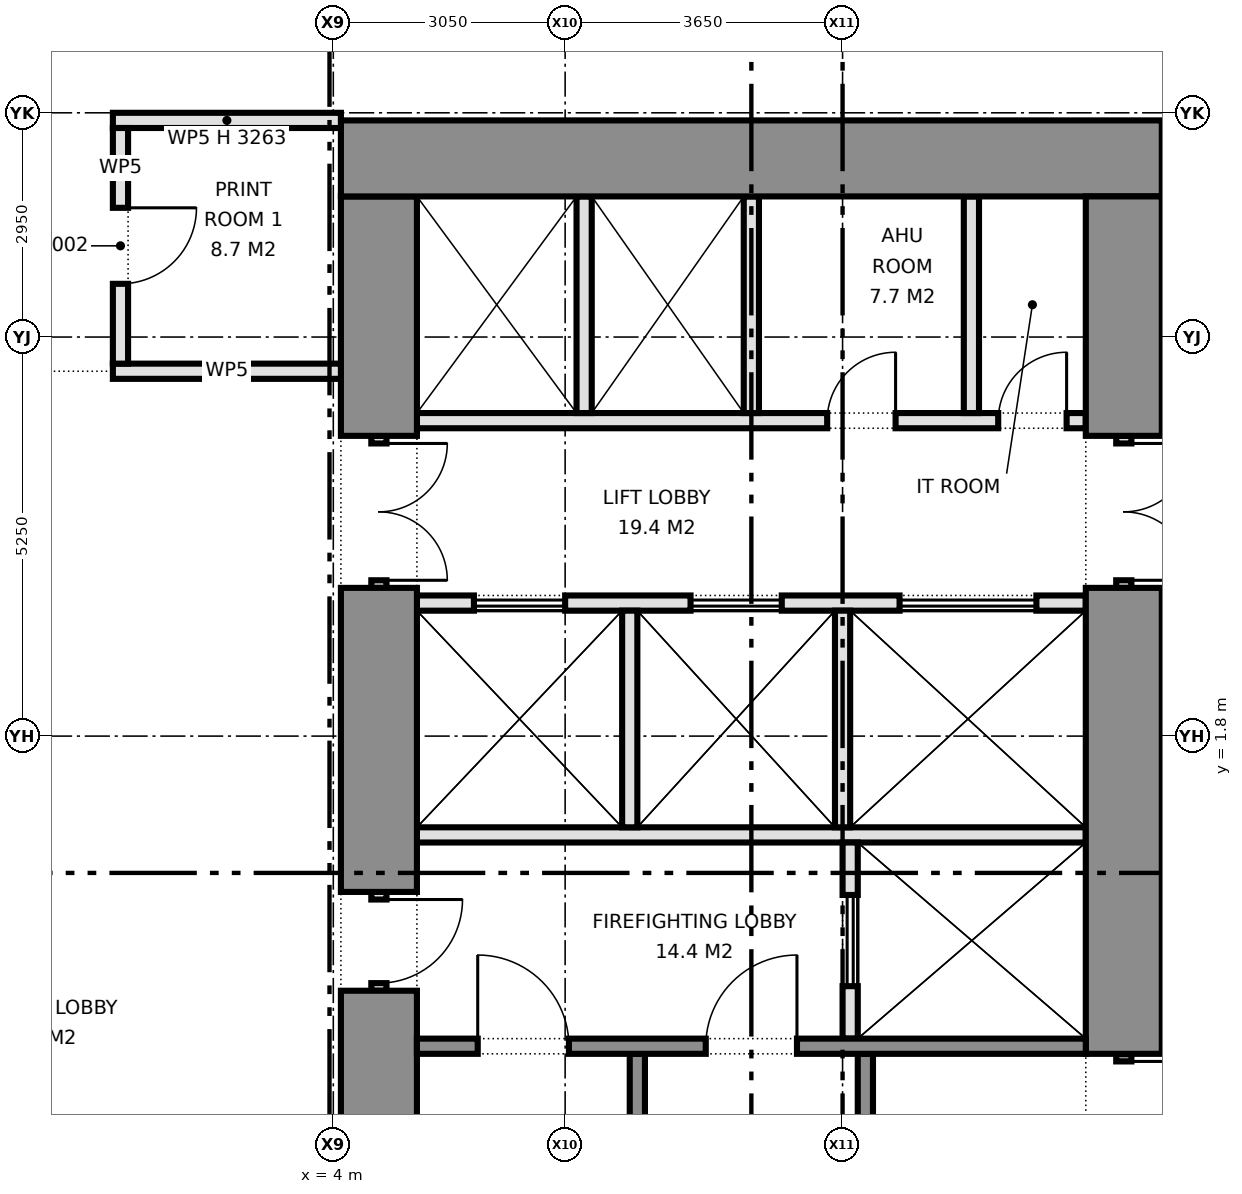
"""IFC4 building model, lengths in metres.
Left out: names, types, materials, properties, quantities, classifications, styles, units other than length and angle.
Written with IfcOpenShell. Run it as: python <this file> out.ifc"""

import sys

from ifc_helpers import new_model, si_unit, direction, frame, frame_2d, origin, place, context, subcontext, project, spatial, rectangle, extrude, element, fill, save


model = new_model("IFC4")
c1 = context("Model", 3, precision=1e-05, world=origin(), true_north=direction((0.0, 1.0)))
c2 = subcontext(c1, "Body", "Model", "MODEL_VIEW")
j1 = project(units=[si_unit("LENGTHUNIT", "METRE"), si_unit("PLANEANGLEUNIT", "RADIAN")], contexts=[c1])
p1 = place(None, origin())
s1 = spatial("IfcSite", under=j1, at=p1, CompositionType="ELEMENT")
p2 = place(p1, origin())
s2 = spatial("IfcBuilding", under=s1, at=p2, CompositionType="ELEMENT")
p3 = place(p2, frame((0.0, 0.0, 73.2)))
s3 = spatial("IfcBuildingStorey", under=s2, at=p3, CompositionType="ELEMENT", Elevation=73.2)
p4 = place(p3, frame((14.9, 9.4, 0.0), z_axis=(0.0, 0.0, 1.0), x_axis=(-1.0, 0.0, 0.0)))
e1 = element("IfcWall", 1, at=p4, inside=s3, PredefinedType="SHEAR", context=c2, shape_type="SweptSolid", body=[
    extrude(rectangle(XDim=10.8, YDim=1.0, at=frame_2d((5.4, 0.0))), origin(), (0.0, 0.0, 1.0), 4.2),
])
p5 = place(p3, frame((14.4, 8.9, 0.0), z_axis=(0.0, 0.0, 1.0), x_axis=(0.0, -1.0, 0.0)))
e2 = element("IfcWall", 2, at=p5, inside=s3, PredefinedType="SHEAR", context=c2, shape_type="SweptSolid", body=[
    extrude(rectangle(XDim=3.15, YDim=1.0, at=frame_2d((1.575, 0.0))), origin(), (0.0, 0.0, 1.0), 4.2),
])
p6 = place(p3, frame((14.4, 5.75, 0.0), z_axis=(0.0, 0.0, 1.0), x_axis=(0.0, -1.0, 0.0)))
e3 = element("IfcWall", 3, at=p6, inside=s3, PredefinedType="PARTITIONING", context=c2, shape_type="SweptSolid", body=[
    extrude(rectangle(XDim=2.0, YDim=0.2, at=frame_2d((1.0, 0.0))), origin(), (0.0, 0.0, 1.0), 2.4),
])
p7 = place(p6, frame((0.1, 0.0, 0.0)))
e4 = element("IfcOpeningElement", 4, at=p7, cuts=e3, PredefinedType="OPENING", context=c2, shape_type="SweptSolid", body=[
    extrude(rectangle(XDim=1.8, YDim=2.1, at=frame_2d((0.9, 1.05))), frame((0.0, 0.11, 0.0), z_axis=(0.0, -1.0, 0.0), x_axis=(1.0, 0.0, 0.0)), (0.0, 0.0, 1.0), 0.22),
])
p8 = place(p3, frame((14.4, 3.75, 0.0), z_axis=(0.0, 0.0, 1.0), x_axis=(0.0, -1.0, 0.0)))
e5 = element("IfcWall", 5, at=p8, inside=s3, PredefinedType="SHEAR", context=c2, shape_type="SweptSolid", body=[
    extrude(rectangle(XDim=6.13, YDim=1.0, at=frame_2d((3.065, 0.0))), origin(), (0.0, 0.0, 1.0), 4.2),
])
p9 = place(p3, frame((14.4, -2.38, 0.0), z_axis=(0.0, 0.0, 1.0), x_axis=(0.0, -1.0, 0.0)))
e6 = element("IfcWall", 6, at=p9, inside=s3, PredefinedType="SHEAR", context=c2, shape_type="SweptSolid", body=[
    extrude(rectangle(XDim=1.3, YDim=0.2, at=frame_2d((0.65, 0.0))), origin(), (0.0, 0.0, 1.0), 2.4),
])
p10 = place(p9, frame((0.1, 0.0, 0.0)))
e7 = element("IfcOpeningElement", 7, at=p10, cuts=e6, PredefinedType="OPENING", context=c2, shape_type="SweptSolid", body=[
    extrude(rectangle(XDim=1.1, YDim=2.1, at=frame_2d((0.55, 1.05))), frame((0.0, 0.11, 0.0), z_axis=(0.0, -1.0, 0.0), x_axis=(1.0, 0.0, 0.0)), (0.0, 0.0, 1.0), 0.22),
])
p11 = place(p3, frame((4.6, 8.9, 0.0), z_axis=(0.0, 0.0, 1.0), x_axis=(0.0, -1.0, 0.0)))
e8 = element("IfcWall", 8, at=p11, inside=s3, PredefinedType="SHEAR", context=c2, shape_type="SweptSolid", body=[
    extrude(rectangle(XDim=3.15, YDim=1.0, at=frame_2d((1.575, 0.0))), origin(), (0.0, 0.0, 1.0), 4.2),
])
p12 = place(p3, frame((4.6, 5.75, 0.0), z_axis=(0.0, 0.0, 1.0), x_axis=(0.0, -1.0, 0.0)))
e9 = element("IfcWall", 9, at=p12, inside=s3, PredefinedType="PARTITIONING", context=c2, shape_type="SweptSolid", body=[
    extrude(rectangle(XDim=2.0, YDim=0.2, at=frame_2d((1.0, 0.0))), origin(), (0.0, 0.0, 1.0), 2.4),
])
p13 = place(p12, frame((0.1, 0.0, 0.0)))
e10 = element("IfcOpeningElement", 10, at=p13, cuts=e9, PredefinedType="OPENING", context=c2, shape_type="SweptSolid", body=[
    extrude(rectangle(XDim=1.8, YDim=2.1, at=frame_2d((0.9, 1.05))), frame((0.0, 0.11, 0.0), z_axis=(0.0, -1.0, 0.0), x_axis=(1.0, 0.0, 0.0)), (0.0, 0.0, 1.0), 0.22),
])
p14 = place(p3, frame((4.6, 3.75, 0.0), z_axis=(0.0, 0.0, 1.0), x_axis=(0.0, -1.0, 0.0)))
e11 = element("IfcWall", 11, at=p14, inside=s3, PredefinedType="SHEAR", context=c2, shape_type="SweptSolid", body=[
    extrude(rectangle(XDim=4.0, YDim=1.0, at=frame_2d((2.0, 0.0))), origin(), (0.0, 0.0, 1.0), 4.2),
])
p15 = place(p3, frame((4.6, -0.25, 0.0), z_axis=(0.0, 0.0, 1.0), x_axis=(0.0, -1.0, 0.0)))
e12 = element("IfcWall", 12, at=p15, inside=s3, PredefinedType="PARTITIONING", context=c2, shape_type="SweptSolid", body=[
    extrude(rectangle(XDim=1.3, YDim=0.2, at=frame_2d((0.65, 0.0))), origin(), (0.0, 0.0, 1.0), 2.4),
])
p16 = place(p15, frame((0.1, 0.0, 0.0)))
e13 = element("IfcOpeningElement", 13, at=p16, cuts=e12, PredefinedType="OPENING", context=c2, shape_type="SweptSolid", body=[
    extrude(rectangle(XDim=1.1, YDim=2.1, at=frame_2d((0.55, 1.05))), frame((0.0, 0.11, 0.0), z_axis=(0.0, -1.0, 0.0), x_axis=(1.0, 0.0, 0.0)), (0.0, 0.0, 1.0), 0.22),
])
p17 = place(p3, frame((4.6, -1.55, 0.0), z_axis=(0.0, 0.0, 1.0), x_axis=(0.0, -1.0, 0.0)))
e14 = element("IfcWall", 14, at=p17, inside=s3, PredefinedType="SHEAR", context=c2, shape_type="SweptSolid", body=[
    extrude(rectangle(XDim=7.35, YDim=1.0, at=frame_2d((3.675, 0.0))), origin(), (0.0, 0.0, 1.0), 4.2),
])
p18 = place(p3, frame((13.9, 5.95, 0.0), z_axis=(0.0, 0.0, 1.0), x_axis=(-1.0, 0.0, 0.0)))
e15 = element("IfcWall", 15, at=p18, inside=s3, PredefinedType="PARTITIONING", context=c2, shape_type="SweptSolid", body=[
    extrude(rectangle(XDim=8.8, YDim=0.2, at=frame_2d((4.4, 0.0))), origin(), (0.0, 0.0, 1.0), 4.2),
])
p19 = place(p18, frame((0.252, 0.0, 0.0)))
e16 = element("IfcOpeningElement", 16, at=p19, cuts=e15, PredefinedType="OPENING", context=c2, shape_type="SweptSolid", body=[
    extrude(rectangle(XDim=0.9, YDim=2.1, at=frame_2d((0.45, 1.05))), frame((0.0, 0.11, 0.0), z_axis=(0.0, -1.0, 0.0), x_axis=(1.0, 0.0, 0.0)), (0.0, 0.0, 1.0), 0.22),
])
p20 = place(p18, frame((2.502, 0.0, 0.0)))
e17 = element("IfcOpeningElement", 17, at=p20, cuts=e15, PredefinedType="OPENING", context=c2, shape_type="SweptSolid", body=[
    extrude(rectangle(XDim=0.9, YDim=2.1, at=frame_2d((0.45, 1.05))), frame((0.0, 0.11, 0.0), z_axis=(0.0, -1.0, 0.0), x_axis=(1.0, 0.0, 0.0)), (0.0, 0.0, 1.0), 0.22),
])
p21 = place(p3, frame((13.9, 3.55, 0.0), z_axis=(0.0, 0.0, 1.0), x_axis=(-1.0, 0.0, 0.0)))
e18 = element("IfcWall", 18, at=p21, inside=s3, PredefinedType="PARTITIONING", context=c2, shape_type="SweptSolid", body=[
    extrude(rectangle(XDim=8.8, YDim=0.2, at=frame_2d((4.4, 0.0))), origin(), (0.0, 0.0, 1.0), 4.2),
])
p22 = place(p21, frame((0.65, 0.0, 0.0)))
e19 = element("IfcOpeningElement", 19, at=p22, cuts=e18, PredefinedType="OPENING", context=c2, shape_type="SweptSolid", body=[
    extrude(rectangle(XDim=1.8, YDim=2.1, at=frame_2d((0.9, 1.05))), frame((0.0, 0.11, 0.0), z_axis=(0.0, -1.0, 0.0), x_axis=(1.0, 0.0, 0.0)), (0.0, 0.0, 1.0), 0.22),
])
p23 = place(p21, frame((4.0, 0.0, 0.0)))
e20 = element("IfcOpeningElement", 20, at=p23, cuts=e18, PredefinedType="OPENING", context=c2, shape_type="SweptSolid", body=[
    extrude(rectangle(XDim=1.2, YDim=2.1, at=frame_2d((0.6, 1.05))), frame((0.0, 0.11, 0.0), z_axis=(0.0, -1.0, 0.0), x_axis=(1.0, 0.0, 0.0)), (0.0, 0.0, 1.0), 0.22),
])
p24 = place(p21, frame((6.85, 0.0, 0.0)))
e21 = element("IfcOpeningElement", 21, at=p24, cuts=e18, PredefinedType="OPENING", context=c2, shape_type="SweptSolid", body=[
    extrude(rectangle(XDim=1.2, YDim=2.1, at=frame_2d((0.6, 1.05))), frame((0.0, 0.11, 0.0), z_axis=(0.0, -1.0, 0.0), x_axis=(1.0, 0.0, 0.0)), (0.0, 0.0, 1.0), 0.22),
])
p25 = place(p3, frame((13.9, 0.5, 0.0), z_axis=(0.0, 0.0, 1.0), x_axis=(-1.0, 0.0, 0.0)))
e22 = element("IfcWall", 22, at=p25, inside=s3, PredefinedType="PARTITIONING", context=c2, shape_type="SweptSolid", body=[
    extrude(rectangle(XDim=8.8, YDim=0.2, at=frame_2d((4.4, 0.0))), origin(), (0.0, 0.0, 1.0), 4.2),
])
p26 = place(p3, frame((10.8, 0.4, 0.0), z_axis=(0.0, 0.0, 1.0), x_axis=(0.0, -1.0, 0.0)))
e23 = element("IfcWall", 23, at=p26, inside=s3, PredefinedType="PARTITIONING", context=c2, shape_type="SweptSolid", body=[
    extrude(rectangle(XDim=2.58, YDim=0.2, at=frame_2d((1.29, 0.0))), origin(), (0.0, 0.0, 1.0), 4.2),
])
p27 = place(p26, frame((0.69, 0.0, 0.0)))
e24 = element("IfcOpeningElement", 24, at=p27, cuts=e23, PredefinedType="OPENING", context=c2, shape_type="SweptSolid", body=[
    extrude(rectangle(XDim=1.2, YDim=2.1, at=frame_2d((0.6, 1.05))), frame((0.0, 0.11, 0.0), z_axis=(0.0, -1.0, 0.0), x_axis=(1.0, 0.0, 0.0)), (0.0, 0.0, 1.0), 0.22),
])
p28 = place(p3, frame((13.9, -2.28, 0.0), z_axis=(0.0, 0.0, 1.0), x_axis=(-1.0, 0.0, 0.0)))
e25 = element("IfcWall", 25, at=p28, inside=s3, PredefinedType="SHEAR", context=c2, shape_type="SweptSolid", body=[
    extrude(rectangle(XDim=8.8, YDim=0.2, at=frame_2d((4.4, 0.0))), origin(), (0.0, 0.0, 1.0), 4.2),
])
p29 = place(p28, frame((3.8, 0.0, 0.0)))
e26 = element("IfcOpeningElement", 26, at=p29, cuts=e25, PredefinedType="OPENING", context=c2, shape_type="SweptSolid", body=[
    extrude(rectangle(XDim=1.2, YDim=2.1, at=frame_2d((0.6, 1.05))), frame((0.0, 0.11, 0.0), z_axis=(0.0, -1.0, 0.0), x_axis=(1.0, 0.0, 0.0)), (0.0, 0.0, 1.0), 0.22),
])
p30 = place(p28, frame((6.8, 0.0, 0.0)))
e27 = element("IfcOpeningElement", 27, at=p30, cuts=e25, PredefinedType="OPENING", context=c2, shape_type="SweptSolid", body=[
    extrude(rectangle(XDim=1.2, YDim=2.1, at=frame_2d((0.6, 1.05))), frame((0.0, 0.11, 0.0), z_axis=(0.0, -1.0, 0.0), x_axis=(1.0, 0.0, 0.0)), (0.0, 0.0, 1.0), 0.22),
])
for number, where, z_axis, x_axis in (
    (28, (11.0, -2.38, 0.0), (0.0, 0.0, 1.0), (0.0, -1.0, 0.0)),
    (29, (8.0, -2.38, 0.0), (0.0, 0.0, 1.0), (0.0, -1.0, 0.0)),
):
    element("IfcWall", number, at=place(p3, frame(where, z_axis=z_axis, x_axis=x_axis)), inside=s3, PredefinedType="SHEAR", context=c2, shape_type="SweptSolid", body=[
        extrude(rectangle(XDim=6.52, YDim=0.2, at=frame_2d((3.26, 0.0))), origin(), (0.0, 0.0, 1.0), 4.2),
    ])
for number, where, z_axis, x_axis in (
    (30, (9.5, 8.9, 0.0), (0.0, 0.0, 1.0), (0.0, -1.0, 0.0)),
    (31, (7.3, 8.9, 0.0), (0.0, 0.0, 1.0), (0.0, -1.0, 0.0)),
    (32, (12.395, 8.9, 0.0), (0.0, 0.0, 1.0), (0.0, -1.0, 0.0)),
    (33, (10.7, 3.45, 0.0), (0.0, 0.0, 1.0), (0.0, -1.0, 0.0)),
    (34, (7.9, 3.45, 0.0), (0.0, 0.0, 1.0), (0.0, -1.0, 0.0)),
):
    element("IfcWall", number, at=place(p3, frame(where, z_axis=z_axis, x_axis=x_axis)), inside=s3, PredefinedType="PARTITIONING", context=c2, shape_type="SweptSolid", body=[
        extrude(rectangle(XDim=2.85, YDim=0.2, at=frame_2d((1.425, 0.0))), origin(), (0.0, 0.0, 1.0), 4.2),
    ])
p31 = place(p3, frame((1.1, 6.6, 0.0), z_axis=(0.0, 0.0, 1.0), x_axis=(1.0, 0.0, 0.0)))
e35 = element("IfcWall", 35, at=p31, inside=s3, PredefinedType="PARTITIONING", context=c2, shape_type="SweptSolid", body=[
    extrude(rectangle(XDim=3.0, YDim=0.2, at=frame_2d((1.5, 0.0))), origin(), (0.0, 0.0, 1.0), 4.2),
])
p32 = place(p3, frame((1.1, 9.9, 0.0), z_axis=(0.0, 0.0, 1.0), x_axis=(1.0, 0.0, 0.0)))
e36 = element("IfcWall", 36, at=p32, inside=s3, PredefinedType="PARTITIONING", context=c2, shape_type="SweptSolid", body=[
    extrude(rectangle(XDim=3.0, YDim=0.2, at=frame_2d((1.5, 0.0))), origin(), (0.0, 0.0, 1.0), 3.263),
])
p33 = place(p3, frame((1.2, 6.7, 0.0), z_axis=(0.0, 0.0, 1.0), x_axis=(0.0, 1.0, 0.0)))
e37 = element("IfcWall", 37, at=p33, inside=s3, PredefinedType="PARTITIONING", context=c2, shape_type="SweptSolid", body=[
    extrude(rectangle(XDim=3.1, YDim=0.2, at=frame_2d((1.55, 0.0))), origin(), (0.0, 0.0, 1.0), 4.2),
])
p34 = place(p33, frame((1.05, 0.0, 0.0)))
e38 = element("IfcOpeningElement", 38, at=p34, cuts=e37, PredefinedType="OPENING", context=c2, shape_type="SweptSolid", body=[
    extrude(rectangle(XDim=1.0, YDim=2.1, at=frame_2d((0.5, 1.05))), frame((0.0, 0.11, 0.0), z_axis=(0.0, -1.0, 0.0), x_axis=(1.0, 0.0, 0.0)), (0.0, 0.0, 1.0), 0.22),
])
p35 = place(p7, origin())
e39 = element("IfcDoor", 39, at=p35, inside=s3, OperationType="DOUBLE_DOOR_SINGLE_SWING", PredefinedType="DOOR", context=c2, shape_type="SweptSolid", body=[
    extrude(rectangle(XDim=1.8, YDim=2.1, at=frame_2d((0.9, 1.05))), frame((0.0, 0.025, 0.0), z_axis=(0.0, -1.0, 0.0), x_axis=(1.0, 0.0, 0.0)), (0.0, 0.0, 1.0), 0.05),
])
fill(e4, e39)
p36 = place(p10, origin())
e40 = element("IfcDoor", 40, at=p36, inside=s3, OperationType="SINGLE_SWING_LEFT", PredefinedType="DOOR", context=c2, shape_type="SweptSolid", body=[
    extrude(rectangle(XDim=1.1, YDim=2.1, at=frame_2d((0.55, 1.05))), frame((0.0, 0.025, 0.0), z_axis=(0.0, -1.0, 0.0), x_axis=(1.0, 0.0, 0.0)), (0.0, 0.0, 1.0), 0.05),
])
fill(e7, e40)
p37 = place(p13, origin())
e41 = element("IfcDoor", 41, at=p37, inside=s3, OperationType="DOUBLE_DOOR_SINGLE_SWING", PredefinedType="DOOR", context=c2, shape_type="SweptSolid", body=[
    extrude(rectangle(XDim=1.8, YDim=2.1, at=frame_2d((0.9, 1.05))), frame((0.0, 0.025, 0.0), z_axis=(0.0, -1.0, 0.0), x_axis=(1.0, 0.0, 0.0)), (0.0, 0.0, 1.0), 0.05),
])
fill(e10, e41)
p38 = place(p16, origin())
e42 = element("IfcDoor", 42, at=p38, inside=s3, OperationType="SINGLE_SWING_LEFT", PredefinedType="DOOR", context=c2, shape_type="SweptSolid", body=[
    extrude(rectangle(XDim=1.1, YDim=2.1, at=frame_2d((0.55, 1.05))), frame((0.0, 0.025, 0.0), z_axis=(0.0, -1.0, 0.0), x_axis=(1.0, 0.0, 0.0)), (0.0, 0.0, 1.0), 0.05),
])
fill(e13, e42)
p39 = place(p22, origin())
e43 = element("IfcDoor", 43, at=p39, inside=s3, OperationType="DOUBLE_DOOR_SLIDING", PredefinedType="DOOR", context=c2, shape_type="SweptSolid", body=[
    extrude(rectangle(XDim=1.8, YDim=2.1, at=frame_2d((0.9, 1.05))), frame((0.0, 0.025, 0.0), z_axis=(0.0, -1.0, 0.0), x_axis=(1.0, 0.0, 0.0)), (0.0, 0.0, 1.0), 0.05),
])
fill(e19, e43)
p40 = place(p23, origin())
e44 = element("IfcDoor", 44, at=p40, inside=s3, OperationType="DOUBLE_DOOR_SLIDING", PredefinedType="DOOR", context=c2, shape_type="SweptSolid", body=[
    extrude(rectangle(XDim=1.2, YDim=2.1, at=frame_2d((0.6, 1.05))), frame((0.0, 0.025, 0.0), z_axis=(0.0, -1.0, 0.0), x_axis=(1.0, 0.0, 0.0)), (0.0, 0.0, 1.0), 0.05),
])
fill(e20, e44)
p41 = place(p24, origin())
e45 = element("IfcDoor", 45, at=p41, inside=s3, OperationType="DOUBLE_DOOR_SLIDING", PredefinedType="DOOR", context=c2, shape_type="SweptSolid", body=[
    extrude(rectangle(XDim=1.2, YDim=2.1, at=frame_2d((0.6, 1.05))), frame((0.0, 0.025, 0.0), z_axis=(0.0, -1.0, 0.0), x_axis=(1.0, 0.0, 0.0)), (0.0, 0.0, 1.0), 0.05),
])
fill(e21, e45)
p42 = place(p27, origin())
e46 = element("IfcDoor", 46, at=p42, inside=s3, OperationType="DOUBLE_DOOR_SLIDING", PredefinedType="DOOR", context=c2, shape_type="SweptSolid", body=[
    extrude(rectangle(XDim=1.2, YDim=2.1, at=frame_2d((0.6, 1.05))), frame((0.0, 0.025, 0.0), z_axis=(0.0, -1.0, 0.0), x_axis=(1.0, 0.0, 0.0)), (0.0, 0.0, 1.0), 0.05),
])
fill(e24, e46)
p43 = place(p19, frame((0.9, 0.0, 0.0), z_axis=(0.0, 0.0, 1.0), x_axis=(-1.0, 0.0, 0.0)))
e47 = element("IfcDoor", 47, at=p43, inside=s3, OperationType="SINGLE_SWING_RIGHT", PredefinedType="DOOR", context=c2, shape_type="SweptSolid", body=[
    extrude(rectangle(XDim=0.9, YDim=2.1, at=frame_2d((0.45, 1.05))), frame((0.0, 0.025, 0.0), z_axis=(0.0, -1.0, 0.0), x_axis=(1.0, 0.0, 0.0)), (0.0, 0.0, 1.0), 0.05),
])
fill(e16, e47)
p44 = place(p20, frame((0.9, 0.0, 0.0), z_axis=(0.0, 0.0, 1.0), x_axis=(-1.0, 0.0, 0.0)))
e48 = element("IfcDoor", 48, at=p44, inside=s3, OperationType="SINGLE_SWING_RIGHT", PredefinedType="DOOR", context=c2, shape_type="SweptSolid", body=[
    extrude(rectangle(XDim=0.9, YDim=2.1, at=frame_2d((0.45, 1.05))), frame((0.0, 0.025, 0.0), z_axis=(0.0, -1.0, 0.0), x_axis=(1.0, 0.0, 0.0)), (0.0, 0.0, 1.0), 0.05),
])
fill(e17, e48)
p45 = place(p29, frame((1.2, 0.0, 0.0), z_axis=(0.0, 0.0, 1.0), x_axis=(-1.0, 0.0, 0.0)))
e49 = element("IfcDoor", 49, at=p45, inside=s3, OperationType="SINGLE_SWING_RIGHT", PredefinedType="DOOR", context=c2, shape_type="SweptSolid", body=[
    extrude(rectangle(XDim=1.2, YDim=2.1, at=frame_2d((0.6, 1.05))), frame((0.0, 0.025, 0.0), z_axis=(0.0, -1.0, 0.0), x_axis=(1.0, 0.0, 0.0)), (0.0, 0.0, 1.0), 0.05),
])
fill(e26, e49)
p46 = place(p30, frame((1.2, 0.0, 0.0), z_axis=(0.0, 0.0, 1.0), x_axis=(-1.0, 0.0, 0.0)))
e50 = element("IfcDoor", 50, at=p46, inside=s3, OperationType="SINGLE_SWING_LEFT", PredefinedType="DOOR", context=c2, shape_type="SweptSolid", body=[
    extrude(rectangle(XDim=1.2, YDim=2.1, at=frame_2d((0.6, 1.05))), frame((0.0, 0.025, 0.0), z_axis=(0.0, -1.0, 0.0), x_axis=(1.0, 0.0, 0.0)), (0.0, 0.0, 1.0), 0.05),
])
fill(e27, e50)
p47 = place(p34, frame((1.0, 0.0, 0.0), z_axis=(0.0, 0.0, 1.0), x_axis=(-1.0, 0.0, 0.0)))
e51 = element("IfcDoor", 51, at=p47, inside=s3, OperationType="SINGLE_SWING_LEFT", PredefinedType="DOOR", context=c2, shape_type="SweptSolid", body=[
    extrude(rectangle(XDim=1.0, YDim=2.1, at=frame_2d((0.5, 1.05))), frame((0.0, 0.025, 0.0), z_axis=(0.0, -1.0, 0.0), x_axis=(1.0, 0.0, 0.0)), (0.0, 0.0, 1.0), 0.05),
])
fill(e38, e51)
save(model, sys.argv[1])
